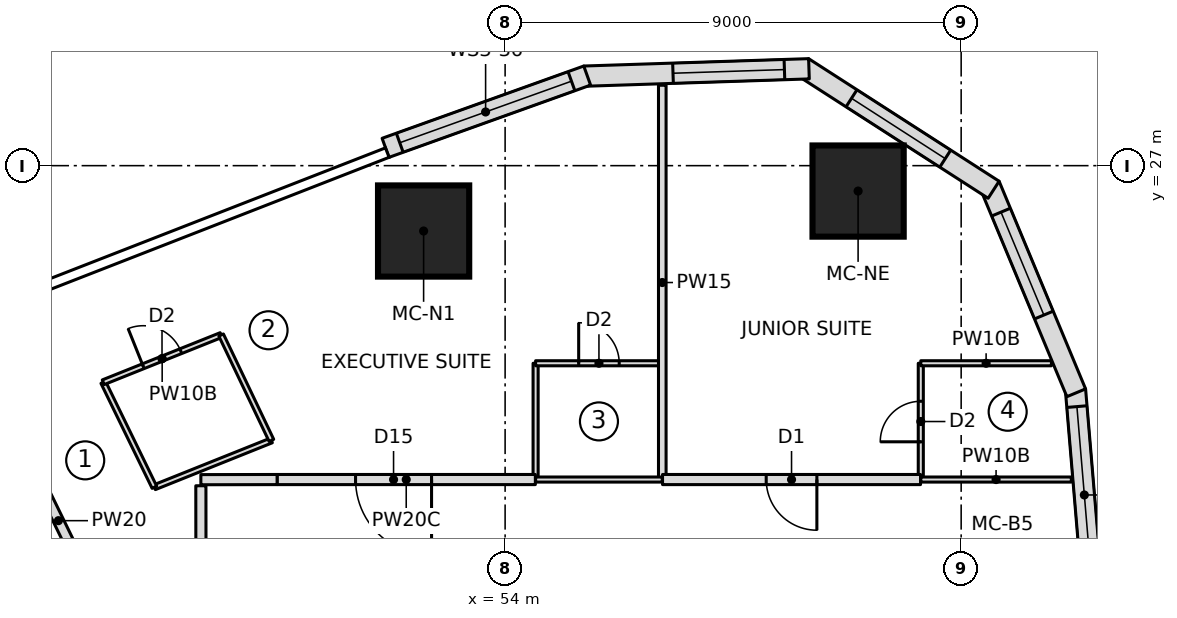
"""IFC4 building model, lengths in metres.
Left out: names, types, materials, properties, quantities, classifications, styles, units other than length and angle.
Written with IfcOpenShell. Run it as: python <this file> out.ifc"""

import sys

from ifc_helpers import new_model, si_unit, direction, frame, frame_2d, origin, origin_2d, place, context, subcontext, project, spatial, polyline, rectangle, outline, extrude, element, fill, save


model = new_model("IFC4")
c1 = context("Model", 3, precision=1e-05, world=origin(), true_north=direction((0.0, 1.0)))
c2 = subcontext(c1, "Body", "Model", "MODEL_VIEW")
j1 = project(units=[si_unit("LENGTHUNIT", "METRE"), si_unit("PLANEANGLEUNIT", "RADIAN")], contexts=[c1])
p1 = place(None, origin())
s1 = spatial("IfcSite", under=j1, at=p1, CompositionType="ELEMENT")
p2 = place(p1, origin())
s2 = spatial("IfcBuilding", under=s1, at=p2, CompositionType="ELEMENT")
p3 = place(p2, frame((0.0, 0.0, 43.15)))
s3 = spatial("IfcBuildingStorey", under=s2, at=p3, CompositionType="ELEMENT", Elevation=43.15)
for number, where, z_axis, x_axis in (
    (1, (60.966, 26.499, 0.0), (0.0, 0.0, 1.0), (1.0, 0.0, 0.0)),
    (2, (52.392, 25.71, 0.0), (0.0, 0.0, 1.0), (1.0, 0.0, 0.0)),
):
    element("IfcColumn", number, at=place(p3, frame(where, z_axis=z_axis, x_axis=x_axis)), inside=s3, PredefinedType="COLUMN", context=c2, shape_type="SweptSolid", body=[
        extrude(rectangle(XDim=1.8, YDim=1.8, at=origin_2d()), origin(), (0.0, 0.0, 1.0), 3.55),
    ])
p4 = place(p3, frame((65.603, 18.455, 0.0), z_axis=(0.0, 0.0, 1.0), x_axis=(-0.083793550906, 0.996483136248, 0.0)))
e3 = element("IfcWall", 3, at=p4, inside=s3, PredefinedType="NOTDEFINED", context=c2, shape_type="SweptSolid", body=[
    extrude(outline(polyline([(-0.002, -0.2), (4.136, -0.2), (4.074, 0.2), (0.002, 0.2), (-0.002, -0.2)])), origin(), (0.0, 0.0, 1.0), 3.25),
])
p5 = place(p4, frame((0.302, 0.0, 0.9)))
e4 = element("IfcOpeningElement", 4, at=p5, cuts=e3, PredefinedType="OPENING", context=c2, shape_type="SweptSolid", body=[
    extrude(rectangle(XDim=3.5, YDim=1.8, at=frame_2d((1.75, 0.9))), frame((0.0, 0.21, 0.0), z_axis=(0.0, -1.0, 0.0), x_axis=(1.0, 0.0, 0.0)), (0.0, 0.0, 1.0), 0.42),
])
p6 = place(p3, frame((65.259, 22.546, 0.0), z_axis=(0.0, 0.0, 1.0), x_axis=(-0.384372042685, 0.923178277908, 0.0)))
e5 = element("IfcWall", 5, at=p6, inside=s3, PredefinedType="NOTDEFINED", context=c2, shape_type="SweptSolid", body=[
    extrude(outline(polyline([(-0.031, -0.2), (4.408, -0.2), (4.283, 0.2), (0.031, 0.2), (-0.031, -0.2)])), origin(), (0.0, 0.0, 1.0), 3.25),
])
p7 = place(p6, frame((1.631, 0.0, 0.6)))
e6 = element("IfcOpeningElement", 6, at=p7, cuts=e5, PredefinedType="OPENING", context=c2, shape_type="SweptSolid", body=[
    extrude(outline(polyline([(0.0, 1.35), (0.084, 1.771), (0.322, 2.128), (0.679, 2.366), (1.1, 2.45), (1.521, 2.366), (1.878, 2.128), (2.116, 1.771), (2.2, 1.35), (2.2, 1.1), (2.116, 0.679), (1.878, 0.322), (1.521, 0.084), (1.1, 0.0), (0.679, 0.084), (0.322, 0.322), (0.084, 0.679), (0.0, 1.1), (0.0, 1.35)])), frame((0.0, 0.21, 0.0), z_axis=(0.0, -1.0, 0.0), x_axis=(1.0, 0.0, 0.0)), (0.0, 0.0, 1.0), 0.42),
])
p8 = place(p3, frame((63.588, 26.558, 0.0), z_axis=(0.0, 0.0, 1.0), x_axis=(-0.840937468718, 0.541132307025, 0.0)))
e7 = element("IfcWall", 7, at=p8, inside=s3, PredefinedType="NOTDEFINED", context=c2, shape_type="SweptSolid", body=[
    extrude(outline(polyline([(-0.062, -0.2), (4.409, -0.2), (4.284, 0.2), (0.062, 0.2), (-0.062, -0.2)])), origin(), (0.0, 0.0, 1.0), 3.25),
])
p9 = place(p8, frame((1.073, 0.0, 0.6)))
e8 = element("IfcOpeningElement", 8, at=p9, cuts=e7, PredefinedType="OPENING", context=c2, shape_type="SweptSolid", body=[
    extrude(outline(polyline([(0.0, 1.35), (0.084, 1.771), (0.322, 2.128), (0.679, 2.366), (1.1, 2.45), (1.521, 2.366), (1.878, 2.128), (2.116, 1.771), (2.2, 1.35), (2.2, 1.1), (2.116, 0.679), (1.878, 0.322), (1.521, 0.084), (1.1, 0.0), (0.679, 0.084), (0.322, 0.322), (0.084, 0.679), (0.0, 1.1), (0.0, 1.35)])), frame((0.0, 0.21, 0.0), z_axis=(0.0, -1.0, 0.0), x_axis=(1.0, 0.0, 0.0)), (0.0, 0.0, 1.0), 0.42),
])
p10 = place(p3, frame((59.934, 28.91, 0.0), z_axis=(0.0, 0.0, 1.0), x_axis=(-0.999463576228, -0.032749958686, 0.0)))
e9 = element("IfcWall", 9, at=p10, inside=s3, PredefinedType="NOTDEFINED", context=c2, shape_type="SweptSolid", body=[
    extrude(outline(polyline([(-0.062, -0.2), (4.378, -0.2), (4.315, 0.2), (0.062, 0.2), (-0.062, -0.2)])), origin(), (0.0, 0.0, 1.0), 3.25),
])
p11 = place(p10, frame((0.422, 0.0, 0.6)))
e10 = element("IfcOpeningElement", 10, at=p11, cuts=e9, PredefinedType="OPENING", context=c2, shape_type="SweptSolid", body=[
    extrude(outline(polyline([(0.0, 1.35), (0.084, 1.771), (0.322, 2.128), (0.679, 2.366), (1.1, 2.45), (1.521, 2.366), (1.878, 2.128), (2.116, 1.771), (2.2, 1.35), (2.2, 1.1), (2.116, 0.679), (1.878, 0.322), (1.521, 0.084), (1.1, 0.0), (0.679, 0.084), (0.322, 0.322), (0.084, 0.679), (0.0, 1.1), (0.0, 1.35)])), frame((0.0, 0.21, 0.0), z_axis=(0.0, -1.0, 0.0), x_axis=(1.0, 0.0, 0.0)), (0.0, 0.0, 1.0), 0.42),
])
p12 = place(p3, frame((55.59, 28.768, 0.0), z_axis=(0.0, 0.0, 1.0), x_axis=(-0.941339752885, -0.337460323057, 0.0)))
e11 = element("IfcWall", 11, at=p12, inside=s3, PredefinedType="NOTDEFINED", context=c2, shape_type="SweptSolid", body=[
    extrude(outline(polyline([(-0.031, -0.2), (4.196, -0.2), (4.196, 0.2), (0.031, 0.2), (-0.031, -0.2)])), origin(), (0.0, 0.0, 1.0), 3.25),
])
p13 = place(p12, frame((0.298, 0.0, 0.9)))
e12 = element("IfcOpeningElement", 12, at=p13, cuts=e11, PredefinedType="OPENING", context=c2, shape_type="SweptSolid", body=[
    extrude(rectangle(XDim=3.6, YDim=1.8, at=frame_2d((1.8, 0.9))), frame((0.0, 0.21, 0.0), z_axis=(0.0, -1.0, 0.0), x_axis=(1.0, 0.0, 0.0)), (0.0, 0.0, 1.0), 0.42),
])
p14 = place(p3, frame((54.602, 20.8, 0.0), z_axis=(0.0, 0.0, 1.0), x_axis=(0.0, 1.0, 0.0)))
e13 = element("IfcWall", 13, at=p14, inside=s3, PredefinedType="PARTITIONING", context=c2, shape_type="SweptSolid", body=[
    extrude(rectangle(XDim=2.3, YDim=0.1, at=frame_2d((1.15, 0.0))), origin(), (0.0, 0.0, 1.0), 3.25),
])
p15 = place(p3, frame((54.602, 23.1, 0.0), z_axis=(0.0, 0.0, 1.0), x_axis=(1.0, 0.0, 0.0)))
e14 = element("IfcWall", 14, at=p15, inside=s3, PredefinedType="PARTITIONING", context=c2, shape_type="SweptSolid", body=[
    extrude(rectangle(XDim=2.5, YDim=0.1, at=frame_2d((1.25, 0.0))), origin(), (0.0, 0.0, 1.0), 3.25),
])
p16 = place(p15, frame((0.85, 0.0, 0.0)))
e15 = element("IfcOpeningElement", 15, at=p16, cuts=e14, PredefinedType="OPENING", context=c2, shape_type="SweptSolid", body=[
    extrude(rectangle(XDim=0.8, YDim=2.1, at=frame_2d((0.4, 1.05))), frame((0.0, 0.06, 0.0), z_axis=(0.0, -1.0, 0.0), x_axis=(1.0, 0.0, 0.0)), (0.0, 0.0, 1.0), 0.12),
])
p17 = place(p3, frame((62.203, 20.8, 0.0), z_axis=(0.0, 0.0, 1.0), x_axis=(0.0, 1.0, 0.0)))
e16 = element("IfcWall", 16, at=p17, inside=s3, PredefinedType="PARTITIONING", context=c2, shape_type="SweptSolid", body=[
    extrude(rectangle(XDim=2.3, YDim=0.1, at=frame_2d((1.15, 0.0))), origin(), (0.0, 0.0, 1.0), 3.25),
])
p18 = place(p17, frame((0.75, 0.0, 0.0)))
e17 = element("IfcOpeningElement", 17, at=p18, cuts=e16, PredefinedType="OPENING", context=c2, shape_type="SweptSolid", body=[
    extrude(rectangle(XDim=0.8, YDim=2.1, at=frame_2d((0.4, 1.05))), frame((0.0, 0.06, 0.0), z_axis=(0.0, -1.0, 0.0), x_axis=(1.0, 0.0, 0.0)), (0.0, 0.0, 1.0), 0.12),
])
p19 = place(p3, frame((62.203, 23.1, 0.0), z_axis=(0.0, 0.0, 1.0), x_axis=(1.0, 0.0, 0.0)))
e18 = element("IfcWall", 18, at=p19, inside=s3, PredefinedType="PARTITIONING", context=c2, shape_type="SweptSolid", body=[
    extrude(rectangle(XDim=2.578, YDim=0.1, at=frame_2d((1.289, 0.0))), origin(), (0.0, 0.0, 1.0), 3.25),
])
p20 = place(p3, frame((57.102, 20.8, 0.0), z_axis=(0.0, 0.0, 1.0), x_axis=(0.0, 1.0, 0.0)))
e19 = element("IfcWall", 19, at=p20, inside=s3, PredefinedType="PARTITIONING", context=c2, shape_type="SweptSolid", body=[
    extrude(rectangle(XDim=7.787, YDim=0.15, at=frame_2d((3.894, 0.0))), origin(), (0.0, 0.0, 1.0), 3.25),
])
p21 = place(p3, frame((46.852, 16.573, 0.0), z_axis=(0.0, 0.0, 1.0), x_axis=(-0.438196739796, 0.898879089328, 0.0)))
e20 = element("IfcWall", 20, at=p21, inside=s3, PredefinedType="PARTITIONING", context=c2, shape_type="SweptSolid", body=[
    extrude(rectangle(XDim=7.611, YDim=0.2, at=frame_2d((3.806, 0.0))), origin(), (0.0, 0.0, 1.0), 3.25),
])
p22 = place(p3, frame((49.388, 21.577, 0.0), z_axis=(0.0, 0.0, 1.0), x_axis=(-0.928266690687, -0.371915247014, 0.0)))
e21 = element("IfcWall", 21, at=p22, inside=s3, PredefinedType="PARTITIONING", context=c2, shape_type="SweptSolid", body=[
    extrude(rectangle(XDim=2.487, YDim=0.1, at=frame_2d((1.244, 0.0))), origin(), (0.0, 0.0, 1.0), 3.25),
])
p23 = place(p3, frame((47.079, 20.652, 0.0), z_axis=(0.0, 0.0, 1.0), x_axis=(-0.438171240168, 0.898891519756, 0.0)))
e22 = element("IfcWall", 22, at=p23, inside=s3, PredefinedType="PARTITIONING", context=c2, shape_type="SweptSolid", body=[
    extrude(rectangle(XDim=2.306, YDim=0.1, at=frame_2d((1.153, 0.0))), origin(), (0.0, 0.0, 1.0), 3.25),
])
p24 = place(p3, frame((46.069, 22.725, 0.0), z_axis=(0.0, 0.0, 1.0), x_axis=(0.928288495333, 0.371860819975, 0.0)))
e23 = element("IfcWall", 23, at=p24, inside=s3, PredefinedType="PARTITIONING", context=c2, shape_type="SweptSolid", body=[
    extrude(rectangle(XDim=2.507, YDim=0.1, at=frame_2d((1.253, 0.0))), origin(), (0.0, 0.0, 1.0), 3.25),
])
p25 = place(p24, frame((0.85, 0.0, 0.0)))
e24 = element("IfcOpeningElement", 24, at=p25, cuts=e23, PredefinedType="OPENING", context=c2, shape_type="SweptSolid", body=[
    extrude(rectangle(XDim=0.8, YDim=2.1, at=frame_2d((0.4, 1.05))), frame((0.0, 0.06, 0.0), z_axis=(0.0, -1.0, 0.0), x_axis=(1.0, 0.0, 0.0)), (0.0, 0.0, 1.0), 0.12),
])
p26 = place(p3, frame((54.597, 20.805, 0.0), z_axis=(0.0, 0.0, 1.0), x_axis=(-1.0, 0.0, 0.0)))
e25 = element("IfcWall", 25, at=p26, inside=s3, PredefinedType="PARTITIONING", context=c2, shape_type="SweptSolid", body=[
    extrude(rectangle(XDim=5.097, YDim=0.2, at=frame_2d((2.548, 0.0))), origin(), (0.0, 0.0, 1.0), 3.25),
])
p27 = place(p26, frame((2.048, 0.0, 0.0)))
e26 = element("IfcOpeningElement", 26, at=p27, cuts=e25, PredefinedType="OPENING", context=c2, shape_type="SweptSolid", body=[
    extrude(rectangle(XDim=1.5, YDim=2.1, at=frame_2d((0.75, 1.05))), frame((0.0, 0.11, 0.0), z_axis=(0.0, -1.0, 0.0), x_axis=(1.0, 0.0, 0.0)), (0.0, 0.0, 1.0), 0.22),
])
p28 = place(p3, frame((62.198, 20.805, 0.0), z_axis=(0.0, 0.0, 1.0), x_axis=(-1.0, 0.0, 0.0)))
e27 = element("IfcWall", 27, at=p28, inside=s3, PredefinedType="PARTITIONING", context=c2, shape_type="SweptSolid", body=[
    extrude(rectangle(XDim=5.092, YDim=0.2, at=frame_2d((2.546, 0.0))), origin(), (0.0, 0.0, 1.0), 3.25),
])
p29 = place(p28, frame((2.046, 0.0, 0.0)))
e28 = element("IfcOpeningElement", 28, at=p29, cuts=e27, PredefinedType="OPENING", context=c2, shape_type="SweptSolid", body=[
    extrude(rectangle(XDim=1.0, YDim=2.1, at=frame_2d((0.5, 1.05))), frame((0.0, 0.11, 0.0), z_axis=(0.0, -1.0, 0.0), x_axis=(1.0, 0.0, 0.0)), (0.0, 0.0, 1.0), 0.22),
])
p30 = place(p3, frame((57.102, 20.805, 0.0), z_axis=(0.0, 0.0, 1.0), x_axis=(-1.0, 0.0, 0.0)))
e29 = element("IfcWall", 29, at=p30, inside=s3, PredefinedType="PARTITIONING", context=c2, shape_type="SweptSolid", body=[
    extrude(rectangle(XDim=2.5, YDim=0.1, at=frame_2d((1.25, 0.0))), origin(), (0.0, 0.0, 1.0), 3.25),
])
p31 = place(p3, frame((65.175, 20.805, 0.0), z_axis=(0.0, 0.0, 1.0), x_axis=(-1.0, 0.0, 0.0)))
e30 = element("IfcWall", 30, at=p31, inside=s3, PredefinedType="PARTITIONING", context=c2, shape_type="SweptSolid", body=[
    extrude(rectangle(XDim=2.971, YDim=0.1, at=frame_2d((1.486, 0.0))), origin(), (0.0, 0.0, 1.0), 3.25),
])
p32 = place(p3, frame((48.396, 23.657, 0.0), z_axis=(0.0, 0.0, 1.0), x_axis=(0.4306119303, -0.902537182327, 0.0)))
e31 = element("IfcWall", 31, at=p32, inside=s3, PredefinedType="PARTITIONING", context=c2, shape_type="SweptSolid", body=[
    extrude(rectangle(XDim=2.305, YDim=0.1, at=frame_2d((1.152, 0.0))), origin(), (0.0, 0.0, 1.0), 3.25),
])
p33 = place(p3, frame((49.5, 20.805, 0.0), z_axis=(0.0, 0.0, 1.0), x_axis=(-0.999998683182, -0.001622847587, 0.0)))
e32 = element("IfcWall", 32, at=p33, inside=s3, PredefinedType="PARTITIONING", context=c2, shape_type="SweptSolid", body=[
    extrude(rectangle(XDim=1.504, YDim=0.2, at=frame_2d((0.752, 0.0))), origin(), (0.0, 0.0, 1.0), 3.25),
])
p34 = place(p3, frame((47.996, 20.682, 0.0), z_axis=(0.0, 0.0, 1.0), x_axis=(0.000869739418, -0.999999621777, 0.0)))
e33 = element("IfcWall", 33, at=p34, inside=s3, PredefinedType="PARTITIONING", context=c2, shape_type="SweptSolid", body=[
    extrude(rectangle(XDim=3.649, YDim=0.2, at=frame_2d((1.825, 0.0))), origin(), (0.0, 0.0, 1.0), 3.25),
])
p35 = place(p34, frame((1.3, 0.0, 0.0)))
e34 = element("IfcOpeningElement", 34, at=p35, cuts=e33, PredefinedType="OPENING", context=c2, shape_type="SweptSolid", body=[
    extrude(rectangle(XDim=1.0, YDim=2.1, at=frame_2d((0.5, 1.05))), frame((0.0, 0.11, 0.0), z_axis=(0.0, -1.0, 0.0), x_axis=(1.0, 0.0, 0.0)), (0.0, 0.0, 1.0), 0.22),
])
p36 = place(p5, origin())
e35 = element("IfcWindow", 35, at=p36, inside=s3, PartitioningType="SINGLE_PANEL", PredefinedType="WINDOW", context=c2, shape_type="SweptSolid", body=[
    extrude(rectangle(XDim=3.5, YDim=1.8, at=frame_2d((1.75, 0.9))), frame((0.0, 0.17, 0.0), z_axis=(0.0, -1.0, 0.0), x_axis=(1.0, 0.0, 0.0)), (0.0, 0.0, 1.0), 0.06),
])
fill(e4, e35)
p37 = place(p7, origin())
e36 = element("IfcWindow", 36, at=p37, inside=s3, PartitioningType="SINGLE_PANEL", PredefinedType="WINDOW", context=c2, shape_type="SweptSolid", body=[
    extrude(outline(polyline([(0.0, 1.35), (0.084, 1.771), (0.322, 2.128), (0.679, 2.366), (1.1, 2.45), (1.521, 2.366), (1.878, 2.128), (2.116, 1.771), (2.2, 1.35), (2.2, 1.1), (2.116, 0.679), (1.878, 0.322), (1.521, 0.084), (1.1, 0.0), (0.679, 0.084), (0.322, 0.322), (0.084, 0.679), (0.0, 1.1), (0.0, 1.35)])), frame((0.0, 0.17, 0.0), z_axis=(0.0, -1.0, 0.0), x_axis=(1.0, 0.0, 0.0)), (0.0, 0.0, 1.0), 0.06),
])
fill(e6, e36)
p38 = place(p9, origin())
e37 = element("IfcWindow", 37, at=p38, inside=s3, PartitioningType="SINGLE_PANEL", PredefinedType="WINDOW", context=c2, shape_type="SweptSolid", body=[
    extrude(outline(polyline([(0.0, 1.35), (0.084, 1.771), (0.322, 2.128), (0.679, 2.366), (1.1, 2.45), (1.521, 2.366), (1.878, 2.128), (2.116, 1.771), (2.2, 1.35), (2.2, 1.1), (2.116, 0.679), (1.878, 0.322), (1.521, 0.084), (1.1, 0.0), (0.679, 0.084), (0.322, 0.322), (0.084, 0.679), (0.0, 1.1), (0.0, 1.35)])), frame((0.0, 0.17, 0.0), z_axis=(0.0, -1.0, 0.0), x_axis=(1.0, 0.0, 0.0)), (0.0, 0.0, 1.0), 0.06),
])
fill(e8, e37)
p39 = place(p11, origin())
e38 = element("IfcWindow", 38, at=p39, inside=s3, PartitioningType="SINGLE_PANEL", PredefinedType="WINDOW", context=c2, shape_type="SweptSolid", body=[
    extrude(outline(polyline([(0.0, 1.35), (0.084, 1.771), (0.322, 2.128), (0.679, 2.366), (1.1, 2.45), (1.521, 2.366), (1.878, 2.128), (2.116, 1.771), (2.2, 1.35), (2.2, 1.1), (2.116, 0.679), (1.878, 0.322), (1.521, 0.084), (1.1, 0.0), (0.679, 0.084), (0.322, 0.322), (0.084, 0.679), (0.0, 1.1), (0.0, 1.35)])), frame((0.0, 0.17, 0.0), z_axis=(0.0, -1.0, 0.0), x_axis=(1.0, 0.0, 0.0)), (0.0, 0.0, 1.0), 0.06),
])
fill(e10, e38)
p40 = place(p13, origin())
e39 = element("IfcWindow", 39, at=p40, inside=s3, PartitioningType="SINGLE_PANEL", PredefinedType="WINDOW", context=c2, shape_type="SweptSolid", body=[
    extrude(rectangle(XDim=3.6, YDim=1.8, at=frame_2d((1.8, 0.9))), frame((0.0, 0.17, 0.0), z_axis=(0.0, -1.0, 0.0), x_axis=(1.0, 0.0, 0.0)), (0.0, 0.0, 1.0), 0.06),
])
fill(e12, e39)
p41 = place(p16, origin())
e40 = element("IfcDoor", 40, at=p41, inside=s3, OperationType="SINGLE_SWING_LEFT", PredefinedType="DOOR", context=c2, shape_type="SweptSolid", body=[
    extrude(rectangle(XDim=0.8, YDim=2.1, at=frame_2d((0.4, 1.05))), frame((0.0, 0.025, 0.0), z_axis=(0.0, -1.0, 0.0), x_axis=(1.0, 0.0, 0.0)), (0.0, 0.0, 1.0), 0.05),
])
fill(e15, e40)
p42 = place(p18, origin())
e41 = element("IfcDoor", 41, at=p42, inside=s3, OperationType="SINGLE_SWING_LEFT", PredefinedType="DOOR", context=c2, shape_type="SweptSolid", body=[
    extrude(rectangle(XDim=0.8, YDim=2.1, at=frame_2d((0.4, 1.05))), frame((0.0, 0.025, 0.0), z_axis=(0.0, -1.0, 0.0), x_axis=(1.0, 0.0, 0.0)), (0.0, 0.0, 1.0), 0.05),
])
fill(e17, e41)
p43 = place(p25, origin())
e42 = element("IfcDoor", 42, at=p43, inside=s3, OperationType="SINGLE_SWING_LEFT", PredefinedType="DOOR", context=c2, shape_type="SweptSolid", body=[
    extrude(rectangle(XDim=0.8, YDim=2.1, at=frame_2d((0.4, 1.05))), frame((0.0, 0.025, 0.0), z_axis=(0.0, -1.0, 0.0), x_axis=(1.0, 0.0, 0.0)), (0.0, 0.0, 1.0), 0.05),
])
fill(e24, e42)
p44 = place(p27, origin())
e43 = element("IfcDoor", 43, at=p44, inside=s3, OperationType="DOUBLE_DOOR_SINGLE_SWING", PredefinedType="DOOR", context=c2, shape_type="SweptSolid", body=[
    extrude(rectangle(XDim=1.5, YDim=2.1, at=frame_2d((0.75, 1.05))), frame((0.0, 0.025, 0.0), z_axis=(0.0, -1.0, 0.0), x_axis=(1.0, 0.0, 0.0)), (0.0, 0.0, 1.0), 0.05),
])
fill(e26, e43)
p45 = place(p29, origin())
e44 = element("IfcDoor", 44, at=p45, inside=s3, OperationType="SINGLE_SWING_LEFT", PredefinedType="DOOR", context=c2, shape_type="SweptSolid", body=[
    extrude(rectangle(XDim=1.0, YDim=2.1, at=frame_2d((0.5, 1.05))), frame((0.0, 0.025, 0.0), z_axis=(0.0, -1.0, 0.0), x_axis=(1.0, 0.0, 0.0)), (0.0, 0.0, 1.0), 0.05),
])
fill(e28, e44)
save(model, sys.argv[1])
